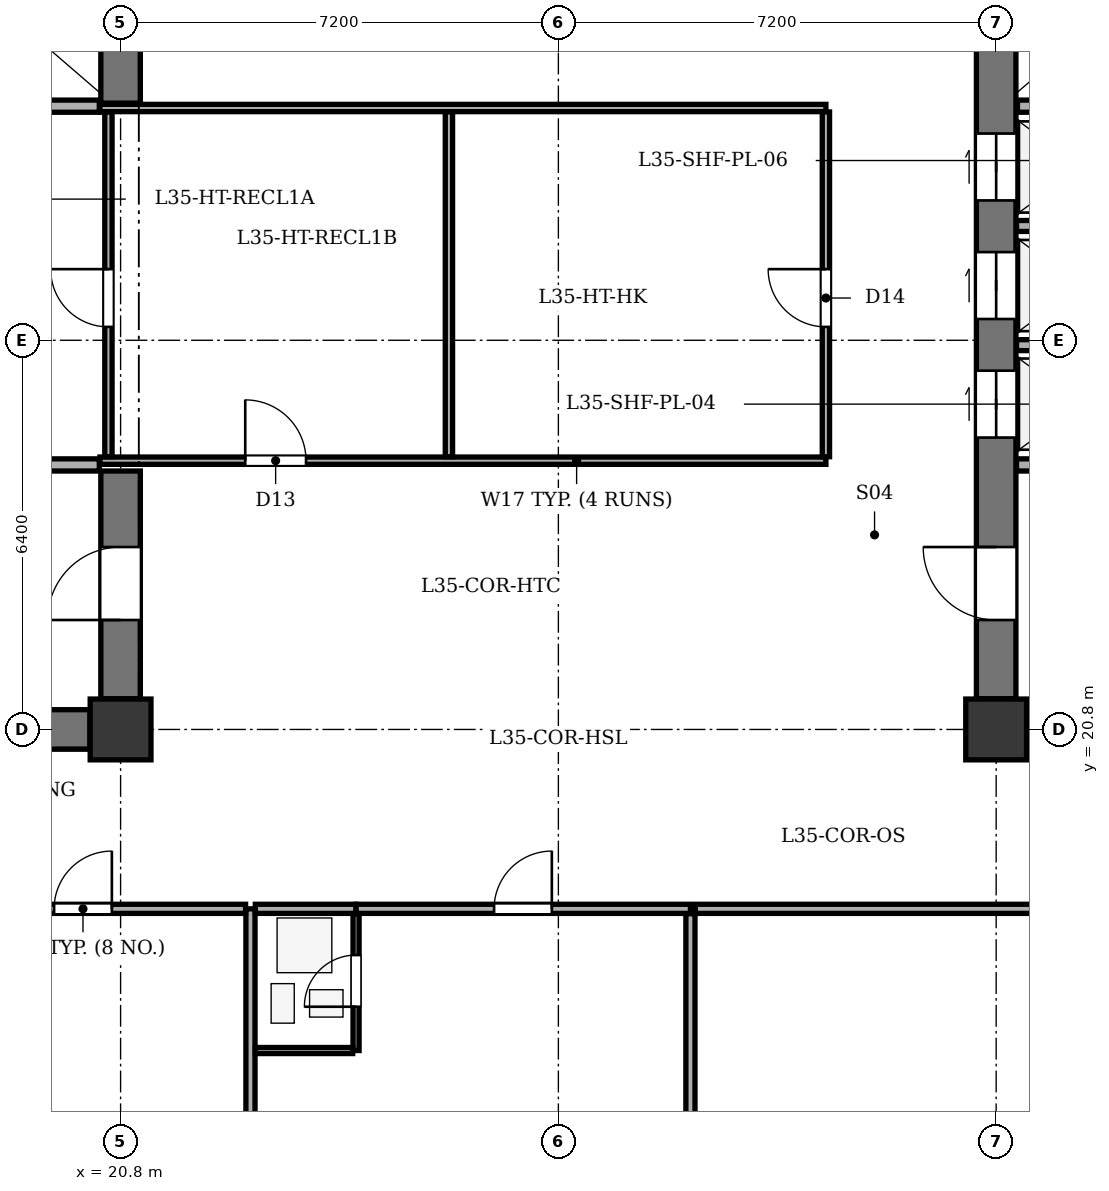
"""IFC4 building model, lengths in metres.
Left out: names, types, materials, properties, quantities, classifications, styles, units other than length and angle.
Written with IfcOpenShell. Run it as: python <this file> out.ifc"""

import sys

from ifc_helpers import new_model, si_unit, direction, frame, frame_2d, origin, origin_2d, place, context, subcontext, project, spatial, rectangle, extrude, element, fill, save


model = new_model("IFC4")
c1 = context("Model", 3, precision=1e-05, world=origin(), true_north=direction((0.0, 1.0)))
c2 = subcontext(c1, "Body", "Model", "MODEL_VIEW")
j1 = project(units=[si_unit("LENGTHUNIT", "METRE"), si_unit("PLANEANGLEUNIT", "RADIAN")], contexts=[c1])
p1 = place(None, origin())
s1 = spatial("IfcSite", under=j1, at=p1, CompositionType="ELEMENT")
p2 = place(p1, origin())
s2 = spatial("IfcBuilding", under=s1, at=p2, CompositionType="ELEMENT")
p3 = place(p2, frame((0.0, 0.0, 141.3)))
s3 = spatial("IfcBuildingStorey", under=s2, at=p3, CompositionType="ELEMENT", Elevation=141.3)
for number, where, z_axis, x_axis in (
    (1, (20.8, 20.8, 0.0), (0.0, 0.0, 1.0), (1.0, 0.0, 0.0)),
    (2, (35.2, 20.8, 0.0), (0.0, 0.0, 1.0), (1.0, 0.0, 0.0)),
):
    element("IfcColumn", number, at=place(p3, frame(where, z_axis=z_axis, x_axis=x_axis)), inside=s3, PredefinedType="COLUMN", context=c2, shape_type="SweptSolid", body=[
        extrude(rectangle(XDim=1.0, YDim=1.0, at=origin_2d()), origin(), (0.0, 0.0, 1.0), 3.5),
    ])
p4 = place(p3, frame((13.305, 20.8, 0.0), z_axis=(0.0, 0.0, 1.0), x_axis=(1.0, 0.0, 0.0)))
e3 = element("IfcWall", 3, at=p4, inside=s3, PredefinedType="SHEAR", context=c2, shape_type="SweptSolid", body=[
    extrude(rectangle(XDim=6.99, YDim=0.65, at=frame_2d((3.495, 0.0))), origin(), (0.0, 0.0, 1.0), 3.2),
])
p5 = place(p3, frame((20.8, 21.305, 0.0), z_axis=(0.0, 0.0, 1.0), x_axis=(0.0, 1.0, 0.0)))
e4 = element("IfcWall", 4, at=p5, inside=s3, PredefinedType="SHEAR", context=c2, shape_type="SweptSolid", body=[
    extrude(rectangle(XDim=3.745, YDim=0.65, at=frame_2d((1.873, 0.0))), origin(), (0.0, 0.0, 1.0), 3.2),
])
p6 = place(p5, frame((1.295, 0.0, 0.0)))
e5 = element("IfcOpeningElement", 5, at=p6, cuts=e4, PredefinedType="OPENING", context=c2, shape_type="SweptSolid", body=[
    extrude(rectangle(XDim=1.2, YDim=2.15, at=frame_2d((0.6, 1.075))), frame((0.0, 0.335, 0.0), z_axis=(0.0, -1.0, 0.0), x_axis=(1.0, 0.0, 0.0)), (0.0, 0.0, 1.0), 0.67),
])
p7 = place(p3, frame((20.8, 31.1, 0.0), z_axis=(0.0, 0.0, 1.0), x_axis=(0.0, 1.0, 0.0)))
e6 = element("IfcWall", 6, at=p7, inside=s3, PredefinedType="SHEAR", context=c2, shape_type="SweptSolid", body=[
    extrude(rectangle(XDim=1.995, YDim=0.65, at=frame_2d((0.998, 0.0))), origin(), (0.0, 0.0, 1.0), 3.2),
])
for number, where, z_axis, x_axis in (
    (7, (16.6, 25.15, 0.0), (0.0, 0.0, 1.0), (1.0, 0.0, 0.0)),
    (8, (16.6, 31.05, 0.0), (0.0, 0.0, 1.0), (1.0, 0.0, 0.0)),
):
    element("IfcWall", number, at=place(p3, frame(where, z_axis=z_axis, x_axis=x_axis)), inside=s3, PredefinedType="SOLIDWALL", context=c2, shape_type="SweptSolid", body=[
        extrude(rectangle(XDim=3.85, YDim=0.2, at=frame_2d((1.925, 0.0))), origin(), (0.0, 0.0, 1.0), 3.2),
    ])
p8 = place(p3, frame((35.705, 20.8, 0.0), z_axis=(0.0, 0.0, 1.0), x_axis=(1.0, 0.0, 0.0)))
e9 = element("IfcWall", 9, at=p8, inside=s3, PredefinedType="SHEAR", context=c2, shape_type="SweptSolid", body=[
    extrude(rectangle(XDim=6.99, YDim=0.65, at=frame_2d((3.495, 0.0))), origin(), (0.0, 0.0, 1.0), 3.2),
])
p9 = place(p3, frame((35.2, 21.305, 0.0), z_axis=(0.0, 0.0, 1.0), x_axis=(0.0, 1.0, 0.0)))
e10 = element("IfcWall", 10, at=p9, inside=s3, PredefinedType="SHEAR", context=c2, shape_type="SweptSolid", body=[
    extrude(rectangle(XDim=11.79, YDim=0.65, at=frame_2d((5.895, 0.0))), origin(), (0.0, 0.0, 1.0), 3.2),
])
p10 = place(p9, frame((1.295, 0.0, 0.0)))
e11 = element("IfcOpeningElement", 11, at=p10, cuts=e10, PredefinedType="OPENING", context=c2, shape_type="SweptSolid", body=[
    extrude(rectangle(XDim=1.2, YDim=2.15, at=frame_2d((0.6, 1.075))), frame((0.0, 0.335, 0.0), z_axis=(0.0, -1.0, 0.0), x_axis=(1.0, 0.0, 0.0)), (0.0, 0.0, 1.0), 0.67),
])
p11 = place(p9, frame((4.295, 0.0, 0.0)))
e12 = element("IfcOpeningElement", 12, at=p11, cuts=e10, PredefinedType="OPENING", context=c2, shape_type="SweptSolid", body=[
    extrude(rectangle(XDim=1.1, YDim=2.1, at=frame_2d((0.55, 1.05))), frame((0.0, 0.335, 0.0), z_axis=(0.0, -1.0, 0.0), x_axis=(1.0, 0.0, 0.0)), (0.0, 0.0, 1.0), 0.67),
])
p12 = place(p9, frame((6.245, 0.0, 0.0)))
e13 = element("IfcOpeningElement", 13, at=p12, cuts=e10, PredefinedType="OPENING", context=c2, shape_type="SweptSolid", body=[
    extrude(rectangle(XDim=1.1, YDim=2.1, at=frame_2d((0.55, 1.05))), frame((0.0, 0.335, 0.0), z_axis=(0.0, -1.0, 0.0), x_axis=(1.0, 0.0, 0.0)), (0.0, 0.0, 1.0), 0.67),
])
p13 = place(p9, frame((8.195, 0.0, 0.0)))
e14 = element("IfcOpeningElement", 14, at=p13, cuts=e10, PredefinedType="OPENING", context=c2, shape_type="SweptSolid", body=[
    extrude(rectangle(XDim=1.1, YDim=2.1, at=frame_2d((0.55, 1.05))), frame((0.0, 0.335, 0.0), z_axis=(0.0, -1.0, 0.0), x_axis=(1.0, 0.0, 0.0)), (0.0, 0.0, 1.0), 0.67),
])
p14 = place(p3, frame((35.535, 25.15, 0.0), z_axis=(0.0, 0.0, 1.0), x_axis=(1.0, 0.0, 0.0)))
e15 = element("IfcWall", 15, at=p14, inside=s3, PredefinedType="SOLIDWALL", context=c2, shape_type="SweptSolid", body=[
    extrude(rectangle(XDim=3.865, YDim=0.2, at=frame_2d((1.933, 0.0))), origin(), (0.0, 0.0, 1.0), 3.2),
])
p15 = place(p3, frame((35.55, 31.05, 0.0), z_axis=(0.0, 0.0, 1.0), x_axis=(1.0, 0.0, 0.0)))
e16 = element("IfcWall", 16, at=p15, inside=s3, PredefinedType="SOLIDWALL", context=c2, shape_type="SweptSolid", body=[
    extrude(rectangle(XDim=2.25, YDim=0.2, at=frame_2d((1.125, 0.0))), origin(), (0.0, 0.0, 1.0), 3.2),
])
for number, where, z_axis, x_axis in (
    (17, (35.535, 27.12, 0.0), (0.0, 0.0, 1.0), (1.0, 0.0, 0.0)),
    (18, (35.535, 29.08, 0.0), (0.0, 0.0, 1.0), (1.0, 0.0, 0.0)),
):
    element("IfcWall", number, at=place(p3, frame(where, z_axis=z_axis, x_axis=x_axis)), inside=s3, PredefinedType="PARTITIONING", context=c2, shape_type="SweptSolid", body=[
        extrude(rectangle(XDim=2.245, YDim=0.18, at=frame_2d((1.123, 0.0))), origin(), (0.0, 0.0, 1.0), 3.2),
    ])
p16 = place(p3, frame((20.46, 25.22, 0.0), z_axis=(0.0, 0.0, 1.0), x_axis=(1.0, 0.0, 0.0)))
e19 = element("IfcWall", 19, at=p16, inside=s3, PredefinedType="PARTITIONING", context=c2, shape_type="SweptSolid", body=[
    extrude(rectangle(XDim=11.94, YDim=0.12, at=frame_2d((5.97, 0.0))), origin(), (0.0, 0.0, 1.0), 3.2),
])
p17 = place(p16, frame((2.39, 0.0, 0.0)))
e20 = element("IfcOpeningElement", 20, at=p17, cuts=e19, PredefinedType="OPENING", context=c2, shape_type="SweptSolid", body=[
    extrude(rectangle(XDim=1.0, YDim=2.1, at=frame_2d((0.5, 1.05))), frame((0.0, 0.07, 0.0), z_axis=(0.0, -1.0, 0.0), x_axis=(1.0, 0.0, 0.0)), (0.0, 0.0, 1.0), 0.14),
])
p18 = place(p3, frame((20.46, 31.02, 0.0), z_axis=(0.0, 0.0, 1.0), x_axis=(1.0, 0.0, 0.0)))
e21 = element("IfcWall", 21, at=p18, inside=s3, PredefinedType="PARTITIONING", context=c2, shape_type="SweptSolid", body=[
    extrude(rectangle(XDim=11.94, YDim=0.12, at=frame_2d((5.97, 0.0))), origin(), (0.0, 0.0, 1.0), 3.2),
])
p19 = place(p3, frame((32.4, 25.285, 0.0), z_axis=(0.0, 0.0, 1.0), x_axis=(0.0, 1.0, 0.0)))
e22 = element("IfcWall", 22, at=p19, inside=s3, PredefinedType="PARTITIONING", context=c2, shape_type="SweptSolid", body=[
    extrude(rectangle(XDim=5.67, YDim=0.12, at=frame_2d((2.835, 0.0))), origin(), (0.0, 0.0, 1.0), 3.2),
])
p20 = place(p19, frame((2.135, 0.0, 0.0)))
e23 = element("IfcOpeningElement", 23, at=p20, cuts=e22, PredefinedType="OPENING", context=c2, shape_type="SweptSolid", body=[
    extrude(rectangle(XDim=0.95, YDim=2.1, at=frame_2d((0.475, 1.05))), frame((0.0, 0.07, 0.0), z_axis=(0.0, -1.0, 0.0), x_axis=(1.0, 0.0, 0.0)), (0.0, 0.0, 1.0), 0.14),
])
p21 = place(p3, frame((20.6, 25.285, 0.0), z_axis=(0.0, 0.0, 1.0), x_axis=(0.0, 1.0, 0.0)))
e24 = element("IfcWall", 24, at=p21, inside=s3, PredefinedType="PARTITIONING", context=c2, shape_type="SweptSolid", body=[
    extrude(rectangle(XDim=5.67, YDim=0.12, at=frame_2d((2.835, 0.0))), origin(), (0.0, 0.0, 1.0), 2.735),
])
p22 = place(p21, frame((2.135, 0.0, 0.0)))
e25 = element("IfcOpeningElement", 25, at=p22, cuts=e24, PredefinedType="OPENING", context=c2, shape_type="SweptSolid", body=[
    extrude(rectangle(XDim=0.95, YDim=2.1, at=frame_2d((0.475, 1.05))), frame((0.0, 0.07, 0.0), z_axis=(0.0, -1.0, 0.0), x_axis=(1.0, 0.0, 0.0)), (0.0, 0.0, 1.0), 0.14),
])
p23 = place(p3, frame((26.2, 25.285, 0.0), z_axis=(0.0, 0.0, 1.0), x_axis=(0.0, 1.0, 0.0)))
e26 = element("IfcWall", 26, at=p23, inside=s3, PredefinedType="PARTITIONING", context=c2, shape_type="SweptSolid", body=[
    extrude(rectangle(XDim=5.67, YDim=0.12, at=frame_2d((2.835, 0.0))), origin(), (0.0, 0.0, 1.0), 3.2),
])
p24 = place(p3, frame((22.936, 1.875, 0.0), z_axis=(0.0, 0.0, 1.0), x_axis=(0.0, 1.0, 0.0)))
e27 = element("IfcWall", 27, at=p24, inside=s3, PredefinedType="PARTITIONING", context=c2, shape_type="SweptSolid", body=[
    extrude(rectangle(XDim=15.975, YDim=0.15, at=frame_2d((7.988, 0.0))), origin(), (0.0, 0.0, 1.0), 3.2),
])
p25 = place(p3, frame((17.437, 17.85, 0.0), z_axis=(0.0, 0.0, 1.0), x_axis=(1.0, 0.0, 0.0)))
e28 = element("IfcWall", 28, at=p25, inside=s3, PredefinedType="PARTITIONING", context=c2, shape_type="SweptSolid", body=[
    extrude(rectangle(XDim=5.419, YDim=0.15, at=frame_2d((2.71, 0.0))), origin(), (0.0, 0.0, 1.0), 3.2),
])
p26 = place(p25, frame((2.27, 0.0, 0.0)))
e29 = element("IfcOpeningElement", 29, at=p26, cuts=e28, PredefinedType="OPENING", context=c2, shape_type="SweptSolid", body=[
    extrude(rectangle(XDim=0.95, YDim=2.1, at=frame_2d((0.475, 1.05))), frame((0.0, 0.085, 0.0), z_axis=(0.0, -1.0, 0.0), x_axis=(1.0, 0.0, 0.0)), (0.0, 0.0, 1.0), 0.17),
])
p27 = place(p3, frame((23.016, 17.85, 0.0), z_axis=(0.0, 0.0, 1.0), x_axis=(1.0, 0.0, 0.0)))
e30 = element("IfcWall", 30, at=p27, inside=s3, PredefinedType="PARTITIONING", context=c2, shape_type="SweptSolid", body=[
    extrude(rectangle(XDim=1.656, YDim=0.15, at=frame_2d((0.828, 0.0))), origin(), (0.0, 0.0, 1.0), 3.2),
])
p28 = place(p3, frame((24.673, 17.85, 0.0), z_axis=(0.0, 0.0, 1.0), x_axis=(1.0, 0.0, 0.0)))
e31 = element("IfcWall", 31, at=p28, inside=s3, PredefinedType="PARTITIONING", context=c2, shape_type="SweptSolid", body=[
    extrude(rectangle(XDim=5.5, YDim=0.15, at=frame_2d((2.75, 0.0))), origin(), (0.0, 0.0, 1.0), 3.2),
])
p29 = place(p28, frame((2.27, 0.0, 0.0)))
e32 = element("IfcOpeningElement", 32, at=p29, cuts=e31, PredefinedType="OPENING", context=c2, shape_type="SweptSolid", body=[
    extrude(rectangle(XDim=0.95, YDim=2.1, at=frame_2d((0.475, 1.05))), frame((0.0, 0.085, 0.0), z_axis=(0.0, -1.0, 0.0), x_axis=(1.0, 0.0, 0.0)), (0.0, 0.0, 1.0), 0.17),
])
p30 = place(p3, frame((24.673, 15.52, 0.0), z_axis=(0.0, 0.0, 1.0), x_axis=(0.0, 1.0, 0.0)))
e33 = element("IfcWall", 33, at=p30, inside=s3, PredefinedType="PARTITIONING", context=c2, shape_type="SweptSolid", body=[
    extrude(rectangle(XDim=2.25, YDim=0.1, at=frame_2d((1.125, 0.0))), origin(), (0.0, 0.0, 1.0), 3.2),
])
p31 = place(p30, frame((0.72, 0.0, 0.0)))
e34 = element("IfcOpeningElement", 34, at=p31, cuts=e33, PredefinedType="OPENING", context=c2, shape_type="SweptSolid", body=[
    extrude(rectangle(XDim=0.85, YDim=2.05, at=frame_2d((0.425, 1.025))), frame((0.0, 0.06, 0.0), z_axis=(0.0, -1.0, 0.0), x_axis=(1.0, 0.0, 0.0)), (0.0, 0.0, 1.0), 0.12),
])
p32 = place(p3, frame((23.016, 15.52, 0.0), z_axis=(0.0, 0.0, 1.0), x_axis=(1.0, 0.0, 0.0)))
e35 = element("IfcWall", 35, at=p32, inside=s3, PredefinedType="PARTITIONING", context=c2, shape_type="SweptSolid", body=[
    extrude(rectangle(XDim=1.602, YDim=0.1, at=frame_2d((0.801, 0.0))), origin(), (0.0, 0.0, 1.0), 3.2),
])
p33 = place(p3, frame((30.172, 1.875, 0.0), z_axis=(0.0, 0.0, 1.0), x_axis=(0.0, 1.0, 0.0)))
e36 = element("IfcWall", 36, at=p33, inside=s3, PredefinedType="PARTITIONING", context=c2, shape_type="SweptSolid", body=[
    extrude(rectangle(XDim=15.895, YDim=0.15, at=frame_2d((7.948, 0.0))), origin(), (0.0, 0.0, 1.0), 3.2),
])
p34 = place(p3, frame((30.252, 17.85, 0.0), z_axis=(0.0, 0.0, 1.0), x_axis=(1.0, 0.0, 0.0)))
e37 = element("IfcWall", 37, at=p34, inside=s3, PredefinedType="PARTITIONING", context=c2, shape_type="SweptSolid", body=[
    extrude(rectangle(XDim=15.598, YDim=0.15, at=frame_2d((7.799, 0.0))), origin(), (0.0, 0.0, 1.0), 3.2),
])
p35 = place(p34, frame((7.239, 0.0, 0.0)))
e38 = element("IfcOpeningElement", 38, at=p35, cuts=e37, PredefinedType="OPENING", context=c2, shape_type="SweptSolid", body=[
    extrude(rectangle(XDim=1.0, YDim=2.1, at=frame_2d((0.5, 1.05))), frame((0.0, 0.085, 0.0), z_axis=(0.0, -1.0, 0.0), x_axis=(1.0, 0.0, 0.0)), (0.0, 0.0, 1.0), 0.17),
])
p36 = place(p6, origin())
e39 = element("IfcDoor", 39, at=p36, inside=s3, OperationType="SINGLE_SWING_LEFT", PredefinedType="DOOR", context=c2, shape_type="SweptSolid", body=[
    extrude(rectangle(XDim=1.2, YDim=2.15, at=frame_2d((0.6, 1.075))), frame((0.0, 0.025, 0.0), z_axis=(0.0, -1.0, 0.0), x_axis=(1.0, 0.0, 0.0)), (0.0, 0.0, 1.0), 0.05),
])
fill(e5, e39)
p37 = place(p10, origin())
e40 = element("IfcDoor", 40, at=p37, inside=s3, OperationType="SINGLE_SWING_RIGHT", PredefinedType="DOOR", context=c2, shape_type="SweptSolid", body=[
    extrude(rectangle(XDim=1.2, YDim=2.15, at=frame_2d((0.6, 1.075))), frame((0.0, 0.025, 0.0), z_axis=(0.0, -1.0, 0.0), x_axis=(1.0, 0.0, 0.0)), (0.0, 0.0, 1.0), 0.05),
])
fill(e11, e40)
p38 = place(p11, origin())
e41 = element("IfcDoor", 41, at=p38, inside=s3, OperationType="DOUBLE_DOOR_SLIDING", PredefinedType="DOOR", context=c2, shape_type="SweptSolid", body=[
    extrude(rectangle(XDim=1.1, YDim=2.1, at=frame_2d((0.55, 1.05))), frame((0.0, 0.025, 0.0), z_axis=(0.0, -1.0, 0.0), x_axis=(1.0, 0.0, 0.0)), (0.0, 0.0, 1.0), 0.05),
])
fill(e12, e41)
p39 = place(p12, origin())
e42 = element("IfcDoor", 42, at=p39, inside=s3, OperationType="DOUBLE_DOOR_SLIDING", PredefinedType="DOOR", context=c2, shape_type="SweptSolid", body=[
    extrude(rectangle(XDim=1.1, YDim=2.1, at=frame_2d((0.55, 1.05))), frame((0.0, 0.025, 0.0), z_axis=(0.0, -1.0, 0.0), x_axis=(1.0, 0.0, 0.0)), (0.0, 0.0, 1.0), 0.05),
])
fill(e13, e42)
p40 = place(p13, origin())
e43 = element("IfcDoor", 43, at=p40, inside=s3, OperationType="DOUBLE_DOOR_SLIDING", PredefinedType="DOOR", context=c2, shape_type="SweptSolid", body=[
    extrude(rectangle(XDim=1.1, YDim=2.1, at=frame_2d((0.55, 1.05))), frame((0.0, 0.025, 0.0), z_axis=(0.0, -1.0, 0.0), x_axis=(1.0, 0.0, 0.0)), (0.0, 0.0, 1.0), 0.05),
])
fill(e14, e43)
p41 = place(p22, origin())
e44 = element("IfcDoor", 44, at=p41, inside=s3, OperationType="SINGLE_SWING_RIGHT", PredefinedType="DOOR", context=c2, shape_type="SweptSolid", body=[
    extrude(rectangle(XDim=0.95, YDim=2.1, at=frame_2d((0.475, 1.05))), frame((0.0, 0.025, 0.0), z_axis=(0.0, -1.0, 0.0), x_axis=(1.0, 0.0, 0.0)), (0.0, 0.0, 1.0), 0.05),
])
fill(e25, e44)
p42 = place(p17, origin())
e45 = element("IfcDoor", 45, at=p42, inside=s3, OperationType="SINGLE_SWING_LEFT", PredefinedType="DOOR", context=c2, shape_type="SweptSolid", body=[
    extrude(rectangle(XDim=1.0, YDim=2.1, at=frame_2d((0.5, 1.05))), frame((0.0, 0.025, 0.0), z_axis=(0.0, -1.0, 0.0), x_axis=(1.0, 0.0, 0.0)), (0.0, 0.0, 1.0), 0.05),
])
fill(e20, e45)
p43 = place(p20, origin())
e46 = element("IfcDoor", 46, at=p43, inside=s3, OperationType="SINGLE_SWING_RIGHT", PredefinedType="DOOR", context=c2, shape_type="SweptSolid", body=[
    extrude(rectangle(XDim=0.95, YDim=2.1, at=frame_2d((0.475, 1.05))), frame((0.0, 0.025, 0.0), z_axis=(0.0, -1.0, 0.0), x_axis=(1.0, 0.0, 0.0)), (0.0, 0.0, 1.0), 0.05),
])
fill(e23, e46)
p44 = place(p26, origin())
e47 = element("IfcDoor", 47, at=p44, inside=s3, OperationType="SINGLE_SWING_RIGHT", PredefinedType="DOOR", context=c2, shape_type="SweptSolid", body=[
    extrude(rectangle(XDim=0.95, YDim=2.1, at=frame_2d((0.475, 1.05))), frame((0.0, 0.025, 0.0), z_axis=(0.0, -1.0, 0.0), x_axis=(1.0, 0.0, 0.0)), (0.0, 0.0, 1.0), 0.05),
])
fill(e29, e47)
p45 = place(p31, origin())
e48 = element("IfcDoor", 48, at=p45, inside=s3, OperationType="SINGLE_SWING_LEFT", PredefinedType="DOOR", context=c2, shape_type="SweptSolid", body=[
    extrude(rectangle(XDim=0.85, YDim=2.05, at=frame_2d((0.425, 1.025))), frame((0.0, 0.025, 0.0), z_axis=(0.0, -1.0, 0.0), x_axis=(1.0, 0.0, 0.0)), (0.0, 0.0, 1.0), 0.05),
])
fill(e34, e48)
p46 = place(p29, origin())
e49 = element("IfcDoor", 49, at=p46, inside=s3, OperationType="SINGLE_SWING_RIGHT", PredefinedType="DOOR", context=c2, shape_type="SweptSolid", body=[
    extrude(rectangle(XDim=0.95, YDim=2.1, at=frame_2d((0.475, 1.05))), frame((0.0, 0.025, 0.0), z_axis=(0.0, -1.0, 0.0), x_axis=(1.0, 0.0, 0.0)), (0.0, 0.0, 1.0), 0.05),
])
fill(e32, e49)
save(model, sys.argv[1])
